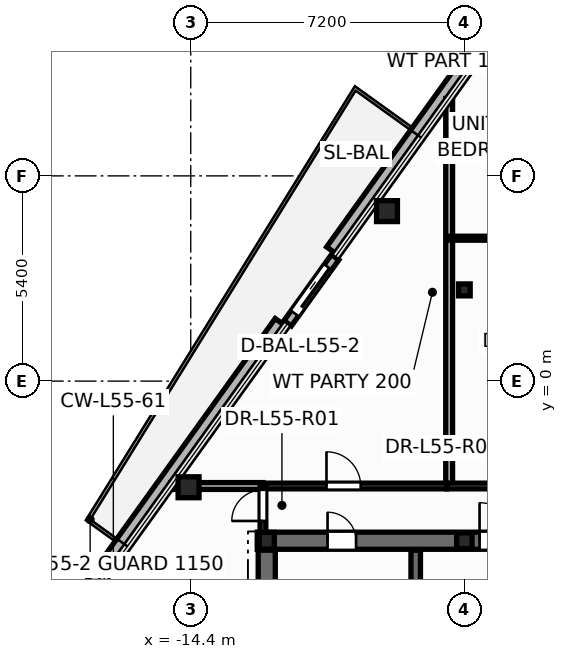
"""IFC4 building model, lengths in metres.
Left out: names, types, materials, properties, quantities, classifications, styles, units other than length and angle.
Written with IfcOpenShell. Run it as: python <this file> out.ifc"""

import sys

from ifc_helpers import new_model, si_unit, direction, frame, frame_2d, origin, origin_2d, place, context, subcontext, project, spatial, rectangle, hollow_circle, i_section, extrude, element, fill, save


model = new_model("IFC4")
c1 = context("Model", 3, precision=1e-05, world=origin(), true_north=direction((0.0, 1.0)))
c2 = subcontext(c1, "Body", "Model", "MODEL_VIEW")
j1 = project(units=[si_unit("LENGTHUNIT", "METRE"), si_unit("PLANEANGLEUNIT", "RADIAN")], contexts=[c1])
p1 = place(None, origin())
s1 = spatial("IfcSite", under=j1, at=p1, CompositionType="ELEMENT")
p2 = place(p1, origin())
s2 = spatial("IfcBuilding", under=s1, at=p2, CompositionType="ELEMENT")
p3 = place(p2, frame((0.0, 0.0, 210.9)))
s3 = spatial("IfcBuildingStorey", under=s2, at=p3, CompositionType="ELEMENT", Elevation=210.9)
for number, where, z_axis, x_axis in (
    (1, (-9.236, 4.473, 0.0), (0.0, 0.0, 1.0), (1.0, 0.0, 0.0)),
    (2, (-14.457, -2.793, 0.0), (0.0, 0.0, 1.0), (1.0, 0.0, 0.0)),
):
    element("IfcColumn", number, at=place(p3, frame(where, z_axis=z_axis, x_axis=x_axis)), inside=s3, PredefinedType="COLUMN", context=c2, shape_type="SweptSolid", body=[
        extrude(hollow_circle(Radius=0.275, WallThickness=0.024, at=origin_2d()), origin(), (0.0, 0.0, 1.0), 3.6),
    ])
p4 = place(p3, frame((-12.4, -4.2, 0.0), z_axis=(0.0, 0.0, 1.0), x_axis=(1.0, 0.0, 0.0)))
e3 = element("IfcColumn", 3, at=p4, inside=s3, PredefinedType="COLUMN", context=c2, shape_type="SweptSolid", body=[
    extrude(i_section(OverallWidth=0.4, OverallDepth=0.44, WebThickness=0.028, FlangeThickness=0.04, at=origin_2d()), origin(), (0.0, 0.0, 1.0), 3.6),
])
p5 = place(p3, frame((-7.2, -4.2, 0.0), z_axis=(0.0, 0.0, 1.0), x_axis=(1.0, 0.0, 0.0)))
e4 = element("IfcColumn", 4, at=p5, inside=s3, PredefinedType="PILASTER", context=c2, shape_type="SweptSolid", body=[
    extrude(i_section(OverallWidth=0.405, OverallDepth=0.414, WebThickness=0.022, FlangeThickness=0.032, at=origin_2d()), origin(), (0.0, 0.0, 1.0), 3.6),
])
p6 = place(p3, frame((-7.2, 2.4, 0.0), z_axis=(0.0, 0.0, 1.0), x_axis=(1.0, 0.0, 0.0)))
e5 = element("IfcColumn", 5, at=p6, inside=s3, PredefinedType="COLUMN", context=c2, shape_type="SweptSolid", body=[
    extrude(i_section(OverallWidth=0.307, OverallDepth=0.314, WebThickness=0.012, FlangeThickness=0.019, at=origin_2d()), origin(), (0.0, 0.0, 1.0), 3.6),
])
p7 = place(p3, frame((-3.55, 13.345, -0.2), z_axis=(0.0, 0.0, 1.0), x_axis=(-0.583557390206, -0.812071900964, 0.0)))
e6 = element("IfcWall", 6, at=p7, inside=s3, PredefinedType="PARAPET", context=c2, shape_type="SweptSolid", body=[
    extrude(rectangle(XDim=12.216, YDim=0.36, at=frame_2d((6.108, 0.0))), origin(), (0.0, 0.0, 1.0), 0.38),
])
p8 = place(p3, frame((-12.032, 1.541, -0.2), z_axis=(0.0, 0.0, 1.0), x_axis=(-0.583546701141, -0.812079582053, 0.0)))
e7 = element("IfcWall", 7, at=p8, inside=s3, PredefinedType="PARAPET", context=c2, shape_type="SweptSolid", body=[
    extrude(rectangle(XDim=15.541, YDim=0.36, at=frame_2d((7.77, 0.0))), origin(), (0.0, 0.0, 1.0), 0.38),
])
p9 = place(p3, frame((-10.601, 3.259, -0.015), z_axis=(0.0, 0.0, 1.0), x_axis=(-0.583556118157, -0.812072815061, 0.0)))
e8 = element("IfcWall", 8, at=p9, inside=s3, PredefinedType="STANDARD", context=c2, shape_type="SweptSolid", body=[
    extrude(rectangle(XDim=2.14, YDim=0.24, at=frame_2d((1.07, 0.0))), origin(), (0.0, 0.0, 1.0), 2.802),
])
p10 = place(p9, frame((0.32, 0.0, 0.015)))
e9 = element("IfcOpeningElement", 9, at=p10, cuts=e8, PredefinedType="OPENING", context=c2, shape_type="SweptSolid", body=[
    extrude(rectangle(XDim=1.506, YDim=2.204, at=frame_2d((0.75, 1.102))), frame((0.0, 0.13, 0.0), z_axis=(0.0, -1.0, 0.0), x_axis=(1.0, 0.0, 0.0)), (0.0, 0.0, 1.0), 0.26),
])
p11 = place(p3, frame((-12.65, -4.2, 0.0), z_axis=(0.0, 0.0, 1.0), x_axis=(1.0, 0.0, 0.0)))
e10 = element("IfcWall", 10, at=p11, inside=s3, PredefinedType="SHEAR", context=c2, shape_type="SweptSolid", body=[
    extrude(rectangle(XDim=25.3, YDim=0.45, at=frame_2d((12.65, 0.0))), origin(), (0.0, 0.0, 1.0), 3.6),
])
p12 = place(p11, frame((1.85, 0.0, 0.0)))
e11 = element("IfcOpeningElement", 11, at=p12, cuts=e10, PredefinedType="OPENING", context=c2, shape_type="SweptSolid", body=[
    extrude(rectangle(XDim=0.756, YDim=2.054, at=frame_2d((0.375, 1.027))), frame((0.0, 0.235, 0.0), z_axis=(0.0, -1.0, 0.0), x_axis=(1.0, 0.0, 0.0)), (0.0, 0.0, 1.0), 0.47),
])
p13 = place(p11, frame((21.85, 0.0, 0.0)))
e12 = element("IfcOpeningElement", 12, at=p13, cuts=e10, PredefinedType="OPENING", context=c2, shape_type="SweptSolid", body=[
    extrude(rectangle(XDim=0.756, YDim=2.054, at=frame_2d((0.375, 1.027))), frame((0.0, 0.235, 0.0), z_axis=(0.0, -1.0, 0.0), x_axis=(1.0, 0.0, 0.0)), (0.0, 0.0, 1.0), 0.47),
])
p14 = place(p11, frame((23.5, 0.0, 0.0)))
e13 = element("IfcOpeningElement", 13, at=p14, cuts=e10, PredefinedType="OPENING", context=c2, shape_type="SweptSolid", body=[
    extrude(rectangle(XDim=0.756, YDim=2.054, at=frame_2d((0.375, 1.027))), frame((0.0, 0.235, 0.0), z_axis=(0.0, -1.0, 0.0), x_axis=(1.0, 0.0, 0.0)), (0.0, 0.0, 1.0), 0.47),
])
p15 = place(p11, frame((5.85, 0.0, 0.0)))
e14 = element("IfcOpeningElement", 14, at=p15, cuts=e10, PredefinedType="OPENING", context=c2, shape_type="SweptSolid", body=[
    extrude(rectangle(XDim=1.006, YDim=2.104, at=frame_2d((0.5, 1.052))), frame((0.0, 0.235, 0.0), z_axis=(0.0, -1.0, 0.0), x_axis=(1.0, 0.0, 0.0)), (0.0, 0.0, 1.0), 0.47),
])
p16 = place(p11, frame((10.35, 0.0, 0.0)))
e15 = element("IfcOpeningElement", 15, at=p16, cuts=e10, PredefinedType="OPENING", context=c2, shape_type="SweptSolid", body=[
    extrude(rectangle(XDim=1.406, YDim=2.154, at=frame_2d((0.7, 1.077))), frame((0.0, 0.235, 0.0), z_axis=(0.0, -1.0, 0.0), x_axis=(1.0, 0.0, 0.0)), (0.0, 0.0, 1.0), 0.47),
])
p17 = place(p11, frame((18.45, 0.0, 0.0)))
e16 = element("IfcOpeningElement", 16, at=p17, cuts=e10, PredefinedType="OPENING", context=c2, shape_type="SweptSolid", body=[
    extrude(rectangle(XDim=1.006, YDim=2.104, at=frame_2d((0.5, 1.052))), frame((0.0, 0.235, 0.0), z_axis=(0.0, -1.0, 0.0), x_axis=(1.0, 0.0, 0.0)), (0.0, 0.0, 1.0), 0.47),
])
p18 = place(p3, frame((-8.48, -13.85, 0.0), z_axis=(0.0, 0.0, 1.0), x_axis=(0.0, 1.0, 0.0)))
e17 = element("IfcWall", 17, at=p18, inside=s3, PredefinedType="SHEAR", context=c2, shape_type="SweptSolid", body=[
    extrude(rectangle(XDim=9.4, YDim=0.25, at=frame_2d((4.7, 0.0))), origin(), (0.0, 0.0, 1.0), 3.6),
])
p19 = place(p18, frame((6.95, 0.0, 0.0)))
e18 = element("IfcOpeningElement", 18, at=p19, cuts=e17, PredefinedType="OPENING", context=c2, shape_type="SweptSolid", body=[
    extrude(rectangle(XDim=1.006, YDim=2.104, at=frame_2d((0.5, 1.052))), frame((0.0, 0.135, 0.0), z_axis=(0.0, -1.0, 0.0), x_axis=(1.0, 0.0, 0.0)), (0.0, 0.0, 1.0), 0.27),
])
p20 = place(p3, frame((-12.4, -13.85, 0.0), z_axis=(0.0, 0.0, 1.0), x_axis=(0.0, 1.0, 0.0)))
e19 = element("IfcWall", 19, at=p20, inside=s3, PredefinedType="SHEAR", context=c2, shape_type="SweptSolid", body=[
    extrude(rectangle(XDim=9.4, YDim=0.45, at=frame_2d((4.7, 0.0))), origin(), (0.0, 0.0, 1.0), 3.6),
])
p21 = place(p3, frame((-7.6, -2.76, 0.0), z_axis=(0.0, 0.0, 1.0), x_axis=(0.0, 1.0, 0.0)))
e20 = element("IfcWall", 20, at=p21, inside=s3, PredefinedType="PARTITIONING", context=c2, shape_type="SweptSolid", body=[
    extrude(rectangle(XDim=10.195, YDim=0.18, at=frame_2d((5.098, 0.0))), origin(), (0.0, 0.0, 1.0), 2.62),
])
p22 = place(p3, frame((-7.66, -2.76, 0.0), z_axis=(0.0, 0.0, 1.0), x_axis=(1.0, 0.0, 0.0)))
e21 = element("IfcWall", 21, at=p22, inside=s3, PredefinedType="PARTITIONING", context=c2, shape_type="SweptSolid", body=[
    extrude(rectangle(XDim=6.12, YDim=0.15, at=frame_2d((3.06, 0.0))), origin(), (0.0, 0.0, 1.0), 2.32),
])
p23 = place(p22, frame((2.032, 0.0, 0.0)))
e22 = element("IfcOpeningElement", 22, at=p23, cuts=e21, PredefinedType="OPENING", context=c2, shape_type="SweptSolid", body=[
    extrude(rectangle(XDim=0.906, YDim=2.104, at=frame_2d((0.45, 1.052))), frame((0.0, 0.085, 0.0), z_axis=(0.0, -1.0, 0.0), x_axis=(1.0, 0.0, 0.0)), (0.0, 0.0, 1.0), 0.17),
])
p24 = place(p3, frame((-12.5, -2.76, 0.0), z_axis=(0.0, 0.0, 1.0), x_axis=(1.0, 0.0, 0.0)))
e23 = element("IfcWall", 23, at=p24, inside=s3, PredefinedType="PARTITIONING", context=c2, shape_type="SweptSolid", body=[
    extrude(rectangle(XDim=4.838, YDim=0.15, at=frame_2d((2.419, 0.0))), origin(), (0.0, 0.0, 1.0), 3.345),
])
p25 = place(p24, frame((1.672, 0.0, 0.0)))
e24 = element("IfcOpeningElement", 24, at=p25, cuts=e23, PredefinedType="OPENING", context=c2, shape_type="SweptSolid", body=[
    extrude(rectangle(XDim=0.906, YDim=2.104, at=frame_2d((0.45, 1.052))), frame((0.0, 0.085, 0.0), z_axis=(0.0, -1.0, 0.0), x_axis=(1.0, 0.0, 0.0)), (0.0, 0.0, 1.0), 0.17),
])
p26 = place(p3, frame((-7.6, 3.76, 0.0), z_axis=(0.0, 0.0, 1.0), x_axis=(1.0, 0.0, 0.0)))
e25 = element("IfcWall", 25, at=p26, inside=s3, PredefinedType="PARTITIONING", context=c2, shape_type="SweptSolid", body=[
    extrude(rectangle(XDim=4.1, YDim=0.105, at=frame_2d((2.05, 0.0))), origin(), (0.0, 0.0, 1.0), 2.62),
])
p27 = place(p26, frame((1.948, 0.0, 0.0)))
e26 = element("IfcOpeningElement", 26, at=p27, cuts=e25, PredefinedType="OPENING", context=c2, shape_type="SweptSolid", body=[
    extrude(rectangle(XDim=0.886, YDim=2.104, at=frame_2d((0.44, 1.052))), frame((0.0, 0.062, 0.0), z_axis=(0.0, -1.0, 0.0), x_axis=(1.0, 0.0, 0.0)), (0.0, 0.0, 1.0), 0.125),
])
p28 = place(p3, frame((-14.926, -2.76, 0.0), z_axis=(0.0, 0.0, 1.0), x_axis=(1.0, 0.0, 0.0)))
e27 = element("IfcWall", 27, at=p28, inside=s3, PredefinedType="PARTITIONING", context=c2, shape_type="SweptSolid", body=[
    extrude(rectangle(XDim=2.426, YDim=0.18, at=frame_2d((1.213, 0.0))), origin(), (0.0, 0.0, 1.0), 2.62),
])
p29 = place(p3, frame((-12.5, -4.24, 0.0), z_axis=(0.0, 0.0, 1.0), x_axis=(0.0, 1.0, 0.0)))
e28 = element("IfcWall", 28, at=p29, inside=s3, PredefinedType="PARTITIONING", context=c2, shape_type="SweptSolid", body=[
    extrude(rectangle(XDim=1.48, YDim=0.15, at=frame_2d((0.74, 0.0))), origin(), (0.0, 0.0, 1.0), 2.32),
])
p30 = place(p29, frame((0.56, 0.0, 0.0)))
e29 = element("IfcOpeningElement", 29, at=p30, cuts=e28, PredefinedType="OPENING", context=c2, shape_type="SweptSolid", body=[
    extrude(rectangle(XDim=0.826, YDim=2.104, at=frame_2d((0.41, 1.052))), frame((0.0, 0.085, 0.0), z_axis=(0.0, -1.0, 0.0), x_axis=(1.0, 0.0, 0.0)), (0.0, 0.0, 1.0), 0.17),
])
p31 = place(p10, origin())
e30 = element("IfcDoor", 30, at=p31, inside=s3, OperationType="SLIDING_TO_RIGHT", PredefinedType="DOOR", context=c2, shape_type="SweptSolid", body=[
    extrude(rectangle(XDim=1.5, YDim=2.2, at=frame_2d((0.75, 1.1))), frame((0.0, 0.025, 0.0), z_axis=(0.0, -1.0, 0.0), x_axis=(1.0, 0.0, 0.0)), (0.0, 0.0, 1.0), 0.05),
])
fill(e9, e30)
p32 = place(p12, origin())
e31 = element("IfcDoor", 31, at=p32, inside=s3, OperationType="SINGLE_SWING_LEFT", PredefinedType="DOOR", context=c2, shape_type="SweptSolid", body=[
    extrude(rectangle(XDim=0.75, YDim=2.05, at=frame_2d((0.375, 1.025))), frame((0.0, 0.025, 0.0), z_axis=(0.0, -1.0, 0.0), x_axis=(1.0, 0.0, 0.0)), (0.0, 0.0, 1.0), 0.05),
])
fill(e11, e31)
p33 = place(p15, origin())
e32 = element("IfcDoor", 32, at=p33, inside=s3, OperationType="SINGLE_SWING_LEFT", PredefinedType="DOOR", context=c2, shape_type="SweptSolid", body=[
    extrude(rectangle(XDim=1.0, YDim=2.1, at=frame_2d((0.5, 1.05))), frame((0.0, 0.025, 0.0), z_axis=(0.0, -1.0, 0.0), x_axis=(1.0, 0.0, 0.0)), (0.0, 0.0, 1.0), 0.05),
])
fill(e14, e32)
p34 = place(p30, origin())
e33 = element("IfcDoor", 33, at=p34, inside=s3, OperationType="SINGLE_SWING_LEFT", PredefinedType="DOOR", context=c2, shape_type="SweptSolid", body=[
    extrude(rectangle(XDim=0.82, YDim=2.1, at=frame_2d((0.41, 1.05))), frame((0.0, 0.025, 0.0), z_axis=(0.0, -1.0, 0.0), x_axis=(1.0, 0.0, 0.0)), (0.0, 0.0, 1.0), 0.05),
])
fill(e29, e33)
p35 = place(p25, origin())
e34 = element("IfcDoor", 34, at=p35, inside=s3, OperationType="SINGLE_SWING_LEFT", PredefinedType="DOOR", context=c2, shape_type="SweptSolid", body=[
    extrude(rectangle(XDim=0.9, YDim=2.1, at=frame_2d((0.45, 1.05))), frame((0.0, 0.025, 0.0), z_axis=(0.0, -1.0, 0.0), x_axis=(1.0, 0.0, 0.0)), (0.0, 0.0, 1.0), 0.05),
])
fill(e24, e34)
save(model, sys.argv[1])
